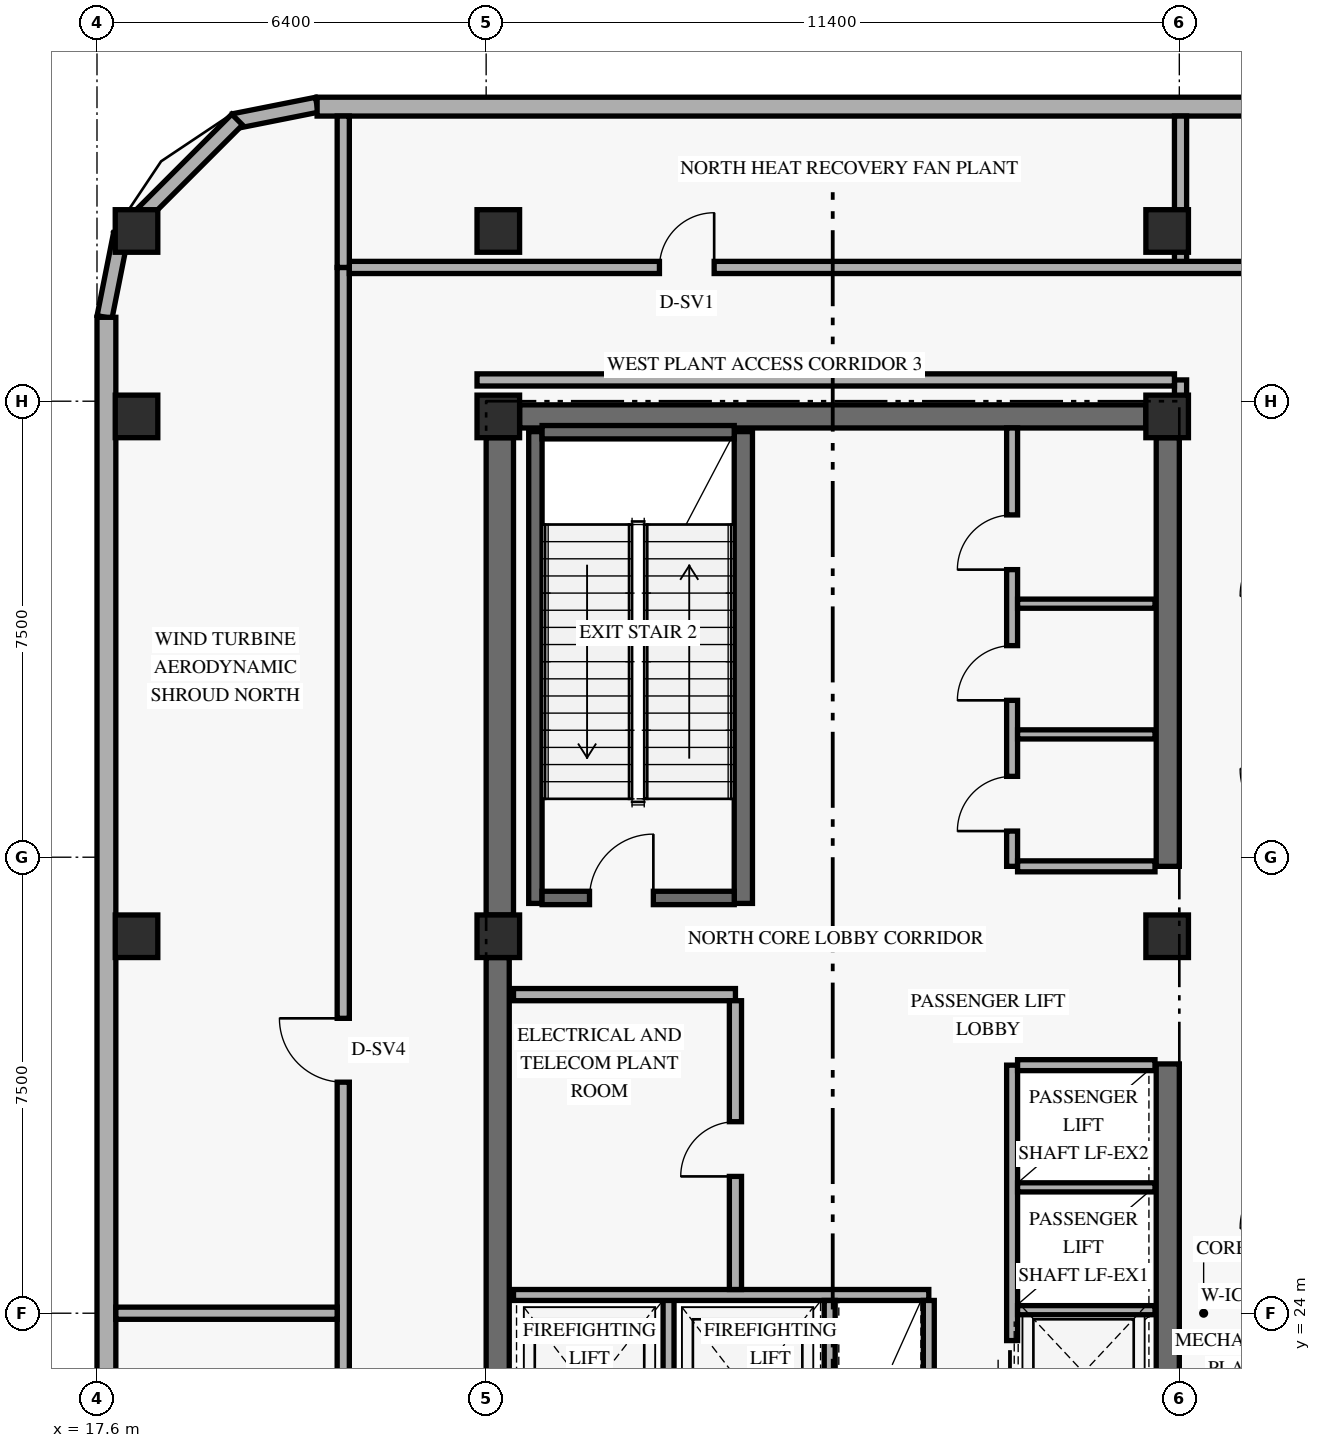
"""IFC4 building model, lengths in metres.
Left out: names, types, materials, properties, quantities, classifications, styles, units other than length and angle.
Written with IfcOpenShell. Run it as: python <this file> out.ifc"""

import sys

from ifc_helpers import new_model, si_unit, direction, frame, frame_2d, origin, origin_2d, place, context, subcontext, project, spatial, rectangle, extrude, element, fill, save


model = new_model("IFC4")
c1 = context("Model", 3, precision=1e-05, world=origin(), true_north=direction((0.0, 1.0)))
c2 = subcontext(c1, "Body", "Model", "MODEL_VIEW")
j1 = project(units=[si_unit("LENGTHUNIT", "METRE"), si_unit("PLANEANGLEUNIT", "RADIAN")], contexts=[c1])
p1 = place(None, origin())
s1 = spatial("IfcSite", under=j1, at=p1, CompositionType="ELEMENT")
p2 = place(p1, origin())
s2 = spatial("IfcBuilding", under=s1, at=p2, CompositionType="ELEMENT")
p3 = place(p2, frame((0.0, 0.0, 199.8)))
s3 = spatial("IfcBuildingStorey", under=s2, at=p3, CompositionType="ELEMENT", Elevation=199.8)
p4 = place(p3, frame((24.19, 17.9, 0.0), z_axis=(0.0, 0.0, 1.0), x_axis=(0.0, 1.0, 0.0)))
e1 = element("IfcWall", 1, at=p4, inside=s3, PredefinedType="SHEAR", context=c2, shape_type="SweptSolid", body=[
    extrude(rectangle(XDim=11.95, YDim=0.38, at=frame_2d((5.975, 0.0))), origin(), (0.0, 0.0, 1.0), 5.148),
])
p5 = place(p3, frame((24.225, 30.55, 0.0), z_axis=(0.0, 0.0, 1.0), x_axis=(0.0, 1.0, 0.0)))
e2 = element("IfcWall", 2, at=p5, inside=s3, PredefinedType="SHEAR", context=c2, shape_type="SweptSolid", body=[
    extrude(rectangle(XDim=7.85, YDim=0.45, at=frame_2d((3.925, 0.0))), origin(), (0.0, 0.0, 1.0), 5.148),
])
p6 = place(p3, frame((35.21, 17.9, 0.0), z_axis=(0.0, 0.0, 1.0), x_axis=(0.0, 1.0, 0.0)))
e3 = element("IfcWall", 3, at=p6, inside=s3, PredefinedType="SHEAR", context=c2, shape_type="SweptSolid", body=[
    extrude(rectangle(XDim=10.2, YDim=0.38, at=frame_2d((5.1, 0.0))), origin(), (0.0, 0.0, 1.0), 5.148),
])
p7 = place(p3, frame((35.21, 31.35, 0.0), z_axis=(0.0, 0.0, 1.0), x_axis=(0.0, 1.0, 0.0)))
e4 = element("IfcWall", 4, at=p7, inside=s3, PredefinedType="SHEAR", context=c2, shape_type="SweptSolid", body=[
    extrude(rectangle(XDim=7.05, YDim=0.38, at=frame_2d((3.525, 0.0))), origin(), (0.0, 0.0, 1.0), 5.148),
])
p8 = place(p3, frame((24.55, 38.75, 0.0), z_axis=(0.0, 0.0, 1.0), x_axis=(1.0, 0.0, 0.0)))
e5 = element("IfcWall", 5, at=p8, inside=s3, PredefinedType="SHEAR", context=c2, shape_type="SweptSolid", body=[
    extrude(rectangle(XDim=10.3, YDim=0.38, at=frame_2d((5.15, 0.0))), origin(), (0.0, 0.0, 1.0), 5.76),
])
p9 = place(p3, frame((24.81, 30.74, 0.0), z_axis=(0.0, 0.0, 1.0), x_axis=(0.0, 1.0, 0.0)))
e6 = element("IfcWall", 6, at=p9, inside=s3, PredefinedType="SHEAR", context=c2, shape_type="SweptSolid", body=[
    extrude(rectangle(XDim=7.76, YDim=0.22, at=frame_2d((3.88, 0.0))), origin(), (0.0, 0.0, 1.0), 5.76),
])
p10 = place(p3, frame((28.23, 30.74, 0.0), z_axis=(0.0, 0.0, 1.0), x_axis=(0.0, 1.0, 0.0)))
e7 = element("IfcWall", 7, at=p10, inside=s3, PredefinedType="SHEAR", context=c2, shape_type="SweptSolid", body=[
    extrude(rectangle(XDim=7.76, YDim=0.3, at=frame_2d((3.88, 0.0))), origin(), (0.0, 0.0, 1.0), 5.76),
])
p11 = place(p3, frame((24.92, 30.83, 0.0), z_axis=(0.0, 0.0, 1.0), x_axis=(1.0, 0.0, 0.0)))
e8 = element("IfcWall", 8, at=p11, inside=s3, PredefinedType="SHEAR", context=c2, shape_type="SweptSolid", body=[
    extrude(rectangle(XDim=3.16, YDim=0.22, at=frame_2d((1.58, 0.0))), origin(), (0.0, 0.0, 1.0), 5.76),
])
p12 = place(p11, frame((0.78, 0.0, 0.0)))
e9 = element("IfcOpeningElement", 9, at=p12, cuts=e8, PredefinedType="OPENING", context=c2, shape_type="SweptSolid", body=[
    extrude(rectangle(XDim=1.05, YDim=2.15, at=frame_2d((0.525, 1.075))), frame((0.0, 0.12, 0.0), z_axis=(0.0, -1.0, 0.0), x_axis=(1.0, 0.0, 0.0)), (0.0, 0.0, 1.0), 0.24),
])
p13 = place(p3, frame((24.92, 38.49, 0.0), z_axis=(0.0, 0.0, 1.0), x_axis=(1.0, 0.0, 0.0)))
e10 = element("IfcWall", 10, at=p13, inside=s3, PredefinedType="SHEAR", context=c2, shape_type="SweptSolid", body=[
    extrude(rectangle(XDim=3.16, YDim=0.22, at=frame_2d((1.58, 0.0))), origin(), (0.0, 0.0, 1.0), 5.76),
])
for number, where, z_axis, x_axis in (
    (11, (18.25, 30.2, 0.0), (0.0, 0.0, 1.0), (1.0, 0.0, 0.0)),
    (12, (18.25, 38.75, 0.0), (0.0, 0.0, 1.0), (1.0, 0.0, 0.0)),
    (13, (18.25, 41.8, 0.0), (0.0, 0.0, 1.0), (1.0, 0.0, 0.0)),
    (14, (24.2, 30.2, 0.0), (0.0, 0.0, 1.0), (1.0, 0.0, 0.0)),
    (15, (24.2, 38.75, 0.0), (0.0, 0.0, 1.0), (1.0, 0.0, 0.0)),
    (16, (24.2, 41.8, 0.0), (0.0, 0.0, 1.0), (1.0, 0.0, 0.0)),
    (17, (35.2, 30.2, 0.0), (0.0, 0.0, 1.0), (1.0, 0.0, 0.0)),
    (18, (35.2, 38.75, 0.0), (0.0, 0.0, 1.0), (1.0, 0.0, 0.0)),
    (19, (35.2, 41.8, 0.0), (0.0, 0.0, 1.0), (1.0, 0.0, 0.0)),
):
    element("IfcColumn", number, at=place(p3, frame(where, z_axis=z_axis, x_axis=x_axis)), inside=s3, PredefinedType="COLUMN", context=c2, shape_type="SweptSolid", body=[
        extrude(rectangle(XDim=0.7, YDim=0.7, at=origin_2d()), origin(), (0.0, 0.0, 1.0), 6.0),
    ])
p14 = place(p3, frame((21.217, 43.876, 0.0), z_axis=(0.0, 0.0, 1.0), x_axis=(-0.980809899341, -0.19496651342, 0.0)))
e20 = element("IfcWall", 20, at=p14, inside=s3, PredefinedType="SOLIDWALL", context=c2, shape_type="SweptSolid", body=[
    extrude(rectangle(XDim=1.389, YDim=0.25, at=frame_2d((0.694, 0.0))), origin(), (0.0, 0.0, 1.0), 5.76),
])
p15 = place(p3, frame((19.905, 43.632, 0.0), z_axis=(0.0, 0.0, 1.0), x_axis=(-0.707106781187, -0.707106781187, 0.0)))
e21 = element("IfcWall", 21, at=p15, inside=s3, PredefinedType="SOLIDWALL", context=c2, shape_type="SweptSolid", body=[
    extrude(rectangle(XDim=2.739, YDim=0.25, at=frame_2d((1.37, 0.0))), origin(), (0.0, 0.0, 1.0), 5.76),
])
p16 = place(p3, frame((17.995, 41.746, 0.0), z_axis=(0.0, 0.0, 1.0), x_axis=(-0.195135625965, -0.9807762678, 0.0)))
e22 = element("IfcWall", 22, at=p16, inside=s3, PredefinedType="SOLIDWALL", context=c2, shape_type="SweptSolid", body=[
    extrude(rectangle(XDim=1.389, YDim=0.25, at=frame_2d((0.694, 0.0))), origin(), (0.0, 0.0, 1.0), 5.76),
])
p17 = place(p3, frame((54.98, 43.845, 0.0), z_axis=(0.0, 0.0, 1.0), x_axis=(-1.0, 0.0, 0.0)))
e23 = element("IfcWall", 23, at=p17, inside=s3, PredefinedType="SOLIDWALL", context=c2, shape_type="SweptSolid", body=[
    extrude(rectangle(XDim=33.76, YDim=0.31, at=frame_2d((16.88, 0.0))), origin(), (0.0, 0.0, 1.0), 5.76),
])
p18 = place(p3, frame((17.755, 40.38, 0.0), z_axis=(0.0, 0.0, 1.0), x_axis=(0.0, -1.0, 0.0)))
e24 = element("IfcWall", 24, at=p18, inside=s3, PredefinedType="SOLIDWALL", context=c2, shape_type="SweptSolid", body=[
    extrude(rectangle(XDim=32.76, YDim=0.31, at=frame_2d((16.38, 0.0))), origin(), (0.0, 0.0, 1.0), 5.76),
])
p19 = place(p3, frame((27.0, 21.19, 0.0), z_axis=(0.0, 0.0, 1.0), x_axis=(0.0, 1.0, 0.0)))
e25 = element("IfcWall", 25, at=p19, inside=s3, PredefinedType="STANDARD", context=c2, shape_type="SweptSolid", body=[
    extrude(rectangle(XDim=3.11, YDim=0.18, at=frame_2d((1.555, 0.0))), origin(), (0.0, 0.0, 1.0), 5.76),
])
p20 = place(p3, frame((24.45, 24.3, 0.0), z_axis=(0.0, 0.0, 1.0), x_axis=(1.0, 0.0, 0.0)))
e26 = element("IfcWall", 26, at=p20, inside=s3, PredefinedType="STANDARD", context=c2, shape_type="SweptSolid", body=[
    extrude(rectangle(XDim=6.83, YDim=0.18, at=frame_2d((3.415, 0.0))), origin(), (0.0, 0.0, 1.0), 5.76),
])
for number, where, z_axis, x_axis in (
    (27, (29.65, 21.19, 0.0), (0.0, 0.0, 1.0), (0.0, 1.0, 0.0)),
    (28, (31.28, 21.19, 0.0), (0.0, 0.0, 1.0), (0.0, 1.0, 0.0)),
):
    element("IfcWall", number, at=place(p3, frame(where, z_axis=z_axis, x_axis=x_axis)), inside=s3, PredefinedType="STANDARD", context=c2, shape_type="SweptSolid", body=[
        extrude(rectangle(XDim=3.02, YDim=0.18, at=frame_2d((1.51, 0.0))), origin(), (0.0, 0.0, 1.0), 5.76),
    ])
p21 = place(p3, frame((24.45, 29.24, 0.0), z_axis=(0.0, 0.0, 1.0), x_axis=(1.0, 0.0, 0.0)))
e29 = element("IfcWall", 29, at=p21, inside=s3, PredefinedType="STANDARD", context=c2, shape_type="SweptSolid", body=[
    extrude(rectangle(XDim=3.65, YDim=0.2, at=frame_2d((1.825, 0.0))), origin(), (0.0, 0.0, 1.0), 5.76),
])
p22 = place(p3, frame((28.1, 24.39, 0.0), z_axis=(0.0, 0.0, 1.0), x_axis=(0.0, 1.0, 0.0)))
e30 = element("IfcWall", 30, at=p22, inside=s3, PredefinedType="STANDARD", context=c2, shape_type="SweptSolid", body=[
    extrude(rectangle(XDim=4.75, YDim=0.2, at=frame_2d((2.375, 0.0))), origin(), (0.0, 0.0, 1.0), 5.76),
])
p23 = place(p22, frame((1.86, 0.0, 0.0)))
e31 = element("IfcOpeningElement", 31, at=p23, cuts=e30, PredefinedType="OPENING", context=c2, shape_type="SweptSolid", body=[
    extrude(rectangle(XDim=0.9, YDim=2.1, at=frame_2d((0.45, 1.05))), frame((0.0, 0.11, 0.0), z_axis=(0.0, -1.0, 0.0), x_axis=(1.0, 0.0, 0.0)), (0.0, 0.0, 1.0), 0.22),
])
p24 = place(p3, frame((32.65, 18.02, 0.0), z_axis=(0.0, 0.0, 1.0), x_axis=(0.0, 1.0, 0.0)))
e32 = element("IfcWall", 32, at=p24, inside=s3, PredefinedType="STANDARD", context=c2, shape_type="SweptSolid", body=[
    extrude(rectangle(XDim=10.06, YDim=0.18, at=frame_2d((5.03, 0.0))), origin(), (0.0, 0.0, 1.0), 5.76),
])
p25 = place(p24, frame((0.48, 0.0, 0.0)))
e33 = element("IfcOpeningElement", 33, at=p25, cuts=e32, PredefinedType="OPENING", context=c2, shape_type="SweptSolid", body=[
    extrude(rectangle(XDim=1.05, YDim=2.2, at=frame_2d((0.525, 1.1))), frame((0.0, 0.1, 0.0), z_axis=(0.0, -1.0, 0.0), x_axis=(1.0, 0.0, 0.0)), (0.0, 0.0, 1.0), 0.2),
])
p26 = place(p24, frame((2.48, 0.0, 0.0)))
e34 = element("IfcOpeningElement", 34, at=p26, cuts=e32, PredefinedType="OPENING", context=c2, shape_type="SweptSolid", body=[
    extrude(rectangle(XDim=1.05, YDim=2.2, at=frame_2d((0.525, 1.1))), frame((0.0, 0.1, 0.0), z_axis=(0.0, -1.0, 0.0), x_axis=(1.0, 0.0, 0.0)), (0.0, 0.0, 1.0), 0.2),
])
p27 = place(p24, frame((4.48, 0.0, 0.0)))
e35 = element("IfcOpeningElement", 35, at=p27, cuts=e32, PredefinedType="OPENING", context=c2, shape_type="SweptSolid", body=[
    extrude(rectangle(XDim=1.05, YDim=2.2, at=frame_2d((0.525, 1.1))), frame((0.0, 0.1, 0.0), z_axis=(0.0, -1.0, 0.0), x_axis=(1.0, 0.0, 0.0)), (0.0, 0.0, 1.0), 0.2),
])
p28 = place(p3, frame((32.74, 28.08, 0.0), z_axis=(0.0, 0.0, 1.0), x_axis=(1.0, 0.0, 0.0)))
e36 = element("IfcWall", 36, at=p28, inside=s3, PredefinedType="STANDARD", context=c2, shape_type="SweptSolid", body=[
    extrude(rectangle(XDim=2.26, YDim=0.18, at=frame_2d((1.13, 0.0))), origin(), (0.0, 0.0, 1.0), 5.76),
])
for number, where, z_axis, x_axis in (
    (37, (32.74, 24.05, 0.0), (0.0, 0.0, 1.0), (1.0, 0.0, 0.0)),
    (38, (32.74, 26.07, 0.0), (0.0, 0.0, 1.0), (1.0, 0.0, 0.0)),
):
    element("IfcWall", number, at=place(p3, frame(where, z_axis=z_axis, x_axis=x_axis)), inside=s3, PredefinedType="STANDARD", context=c2, shape_type="SweptSolid", body=[
        extrude(rectangle(XDim=2.26, YDim=0.15, at=frame_2d((1.13, 0.0))), origin(), (0.0, 0.0, 1.0), 5.76),
    ])
p29 = place(p3, frame((32.65, 31.35, 0.0), z_axis=(0.0, 0.0, 1.0), x_axis=(0.0, 1.0, 0.0)))
e39 = element("IfcWall", 39, at=p29, inside=s3, PredefinedType="STANDARD", context=c2, shape_type="SweptSolid", body=[
    extrude(rectangle(XDim=7.21, YDim=0.18, at=frame_2d((3.605, 0.0))), origin(), (0.0, 0.0, 1.0), 5.76),
])
p30 = place(p29, frame((0.58, 0.0, 0.0)))
e40 = element("IfcOpeningElement", 40, at=p30, cuts=e39, PredefinedType="OPENING", context=c2, shape_type="SweptSolid", body=[
    extrude(rectangle(XDim=0.9, YDim=2.1, at=frame_2d((0.45, 1.05))), frame((0.0, 0.1, 0.0), z_axis=(0.0, -1.0, 0.0), x_axis=(1.0, 0.0, 0.0)), (0.0, 0.0, 1.0), 0.2),
])
p31 = place(p29, frame((2.73, 0.0, 0.0)))
e41 = element("IfcOpeningElement", 41, at=p31, cuts=e39, PredefinedType="OPENING", context=c2, shape_type="SweptSolid", body=[
    extrude(rectangle(XDim=0.9, YDim=2.1, at=frame_2d((0.45, 1.05))), frame((0.0, 0.1, 0.0), z_axis=(0.0, -1.0, 0.0), x_axis=(1.0, 0.0, 0.0)), (0.0, 0.0, 1.0), 0.2),
])
p32 = place(p29, frame((4.88, 0.0, 0.0)))
e42 = element("IfcOpeningElement", 42, at=p32, cuts=e39, PredefinedType="OPENING", context=c2, shape_type="SweptSolid", body=[
    extrude(rectangle(XDim=0.9, YDim=2.1, at=frame_2d((0.45, 1.05))), frame((0.0, 0.1, 0.0), z_axis=(0.0, -1.0, 0.0), x_axis=(1.0, 0.0, 0.0)), (0.0, 0.0, 1.0), 0.2),
])
p33 = place(p3, frame((32.74, 31.35, 0.0), z_axis=(0.0, 0.0, 1.0), x_axis=(1.0, 0.0, 0.0)))
e43 = element("IfcWall", 43, at=p33, inside=s3, PredefinedType="STANDARD", context=c2, shape_type="SweptSolid", body=[
    extrude(rectangle(XDim=2.26, YDim=0.18, at=frame_2d((1.13, 0.0))), origin(), (0.0, 0.0, 1.0), 5.76),
])
for number, where, z_axis, x_axis in (
    (44, (32.74, 33.52, 0.0), (0.0, 0.0, 1.0), (1.0, 0.0, 0.0)),
    (45, (32.74, 35.67, 0.0), (0.0, 0.0, 1.0), (1.0, 0.0, 0.0)),
):
    element("IfcWall", number, at=place(p3, frame(where, z_axis=z_axis, x_axis=x_axis)), inside=s3, PredefinedType="STANDARD", context=c2, shape_type="SweptSolid", body=[
        extrude(rectangle(XDim=2.26, YDim=0.15, at=frame_2d((1.13, 0.0))), origin(), (0.0, 0.0, 1.0), 5.76),
    ])
p34 = place(p3, frame((35.42, 38.75, 0.0), z_axis=(0.0, 0.0, 1.0), x_axis=(0.0, 1.0, 0.0)))
e46 = element("IfcWall", 46, at=p34, inside=s3, PredefinedType="STANDARD", context=c2, shape_type="SweptSolid", body=[
    extrude(rectangle(XDim=0.6, YDim=0.2, at=frame_2d((0.3, 0.0))), origin(), (0.0, 0.0, 1.0), 5.13),
])
p35 = place(p3, frame((35.42, 41.2, 0.0), z_axis=(0.0, 0.0, 1.0), x_axis=(0.0, 1.0, 0.0)))
e47 = element("IfcWall", 47, at=p35, inside=s3, PredefinedType="STANDARD", context=c2, shape_type="SweptSolid", body=[
    extrude(rectangle(XDim=2.49, YDim=0.2, at=frame_2d((1.245, 0.0))), origin(), (0.0, 0.0, 1.0), 5.13),
])
p36 = place(p3, frame((21.65, 6.8, 0.0), z_axis=(0.0, 0.0, 1.0), x_axis=(0.0, 1.0, 0.0)))
e48 = element("IfcWall", 48, at=p36, inside=s3, PredefinedType="STANDARD", context=c2, shape_type="SweptSolid", body=[
    extrude(rectangle(XDim=34.4, YDim=0.2, at=frame_2d((17.2, 0.0))), origin(), (0.0, 0.0, 1.0), 5.13),
])
p37 = place(p36, frame((7.0, 0.0, 0.0)))
e49 = element("IfcOpeningElement", 49, at=p37, cuts=e48, PredefinedType="OPENING", context=c2, shape_type="SweptSolid", body=[
    extrude(rectangle(XDim=1.05, YDim=2.15, at=frame_2d((0.525, 1.075))), frame((0.0, 0.11, 0.0), z_axis=(0.0, -1.0, 0.0), x_axis=(1.0, 0.0, 0.0)), (0.0, 0.0, 1.0), 0.22),
])
p38 = place(p36, frame((21.0, 0.0, 0.0)))
e50 = element("IfcOpeningElement", 50, at=p38, cuts=e48, PredefinedType="OPENING", context=c2, shape_type="SweptSolid", body=[
    extrude(rectangle(XDim=1.05, YDim=2.15, at=frame_2d((0.525, 1.075))), frame((0.0, 0.11, 0.0), z_axis=(0.0, -1.0, 0.0), x_axis=(1.0, 0.0, 0.0)), (0.0, 0.0, 1.0), 0.22),
])
p39 = place(p3, frame((21.75, 41.2, 0.0), z_axis=(0.0, 0.0, 1.0), x_axis=(1.0, 0.0, 0.0)))
e51 = element("IfcWall", 51, at=p39, inside=s3, PredefinedType="STANDARD", context=c2, shape_type="SweptSolid", body=[
    extrude(rectangle(XDim=15.6, YDim=0.2, at=frame_2d((7.8, 0.0))), origin(), (0.0, 0.0, 1.0), 5.13),
])
p40 = place(p39, frame((5.1, 0.0, 0.0)))
e52 = element("IfcOpeningElement", 52, at=p40, cuts=e51, PredefinedType="OPENING", context=c2, shape_type="SweptSolid", body=[
    extrude(rectangle(XDim=0.9, YDim=2.1, at=frame_2d((0.45, 1.05))), frame((0.0, 0.11, 0.0), z_axis=(0.0, -1.0, 0.0), x_axis=(1.0, 0.0, 0.0)), (0.0, 0.0, 1.0), 0.22),
])
p41 = place(p3, frame((23.85, 39.35, 0.0), z_axis=(0.0, 0.0, 1.0), x_axis=(1.0, 0.0, 0.0)))
e53 = element("IfcWall", 53, at=p41, inside=s3, PredefinedType="STANDARD", context=c2, shape_type="SweptSolid", body=[
    extrude(rectangle(XDim=11.47, YDim=0.2, at=frame_2d((5.735, 0.0))), origin(), (0.0, 0.0, 1.0), 5.13),
])
p42 = place(p3, frame((21.65, 41.2, 0.0), z_axis=(0.0, 0.0, 1.0), x_axis=(0.0, 1.0, 0.0)))
e54 = element("IfcWall", 54, at=p42, inside=s3, PredefinedType="STANDARD", context=c2, shape_type="SweptSolid", body=[
    extrude(rectangle(XDim=2.49, YDim=0.2, at=frame_2d((1.245, 0.0))), origin(), (0.0, 0.0, 1.0), 5.279),
])
p43 = place(p3, frame((17.91, 24.0, 0.0), z_axis=(0.0, 0.0, 1.0), x_axis=(1.0, 0.0, 0.0)))
e55 = element("IfcWall", 55, at=p43, inside=s3, PredefinedType="STANDARD", context=c2, shape_type="SweptSolid", body=[
    extrude(rectangle(XDim=3.64, YDim=0.2, at=frame_2d((1.82, 0.0))), origin(), (0.0, 0.0, 1.0), 5.279),
])
p44 = place(p12, origin())
e56 = element("IfcDoor", 56, at=p44, inside=s3, OperationType="SINGLE_SWING_RIGHT", PredefinedType="DOOR", context=c2, shape_type="SweptSolid", body=[
    extrude(rectangle(XDim=1.05, YDim=2.15, at=frame_2d((0.525, 1.075))), frame((0.0, 0.025, 0.0), z_axis=(0.0, -1.0, 0.0), x_axis=(1.0, 0.0, 0.0)), (0.0, 0.0, 1.0), 0.05),
])
fill(e9, e56)
p45 = place(p23, origin())
e57 = element("IfcDoor", 57, at=p45, inside=s3, OperationType="SINGLE_SWING_LEFT", PredefinedType="DOOR", context=c2, shape_type="SweptSolid", body=[
    extrude(rectangle(XDim=0.9, YDim=2.1, at=frame_2d((0.45, 1.05))), frame((0.0, 0.025, 0.0), z_axis=(0.0, -1.0, 0.0), x_axis=(1.0, 0.0, 0.0)), (0.0, 0.0, 1.0), 0.05),
])
fill(e31, e57)
p46 = place(p27, origin())
e58 = element("IfcDoor", 58, at=p46, inside=s3, OperationType="SLIDING_TO_LEFT", PredefinedType="DOOR", context=c2, shape_type="SweptSolid", body=[
    extrude(rectangle(XDim=1.05, YDim=2.2, at=frame_2d((0.525, 1.1))), frame((0.0, 0.025, 0.0), z_axis=(0.0, -1.0, 0.0), x_axis=(1.0, 0.0, 0.0)), (0.0, 0.0, 1.0), 0.05),
])
fill(e35, e58)
p47 = place(p30, origin())
e59 = element("IfcDoor", 59, at=p47, inside=s3, OperationType="SINGLE_SWING_LEFT", PredefinedType="DOOR", context=c2, shape_type="SweptSolid", body=[
    extrude(rectangle(XDim=0.9, YDim=2.1, at=frame_2d((0.45, 1.05))), frame((0.0, 0.025, 0.0), z_axis=(0.0, -1.0, 0.0), x_axis=(1.0, 0.0, 0.0)), (0.0, 0.0, 1.0), 0.05),
])
fill(e40, e59)
p48 = place(p31, origin())
e60 = element("IfcDoor", 60, at=p48, inside=s3, OperationType="SINGLE_SWING_LEFT", PredefinedType="DOOR", context=c2, shape_type="SweptSolid", body=[
    extrude(rectangle(XDim=0.9, YDim=2.1, at=frame_2d((0.45, 1.05))), frame((0.0, 0.025, 0.0), z_axis=(0.0, -1.0, 0.0), x_axis=(1.0, 0.0, 0.0)), (0.0, 0.0, 1.0), 0.05),
])
fill(e41, e60)
p49 = place(p32, origin())
e61 = element("IfcDoor", 61, at=p49, inside=s3, OperationType="SINGLE_SWING_LEFT", PredefinedType="DOOR", context=c2, shape_type="SweptSolid", body=[
    extrude(rectangle(XDim=0.9, YDim=2.1, at=frame_2d((0.45, 1.05))), frame((0.0, 0.025, 0.0), z_axis=(0.0, -1.0, 0.0), x_axis=(1.0, 0.0, 0.0)), (0.0, 0.0, 1.0), 0.05),
])
fill(e42, e61)
p50 = place(p38, origin())
e62 = element("IfcDoor", 62, at=p50, inside=s3, OperationType="SINGLE_SWING_RIGHT", PredefinedType="DOOR", context=c2, shape_type="SweptSolid", body=[
    extrude(rectangle(XDim=1.05, YDim=2.15, at=frame_2d((0.525, 1.075))), frame((0.0, 0.025, 0.0), z_axis=(0.0, -1.0, 0.0), x_axis=(1.0, 0.0, 0.0)), (0.0, 0.0, 1.0), 0.05),
])
fill(e50, e62)
p51 = place(p40, origin())
e63 = element("IfcDoor", 63, at=p51, inside=s3, OperationType="SINGLE_SWING_RIGHT", PredefinedType="DOOR", context=c2, shape_type="SweptSolid", body=[
    extrude(rectangle(XDim=0.9, YDim=2.1, at=frame_2d((0.45, 1.05))), frame((0.0, 0.025, 0.0), z_axis=(0.0, -1.0, 0.0), x_axis=(1.0, 0.0, 0.0)), (0.0, 0.0, 1.0), 0.05),
])
fill(e52, e63)
save(model, sys.argv[1])
